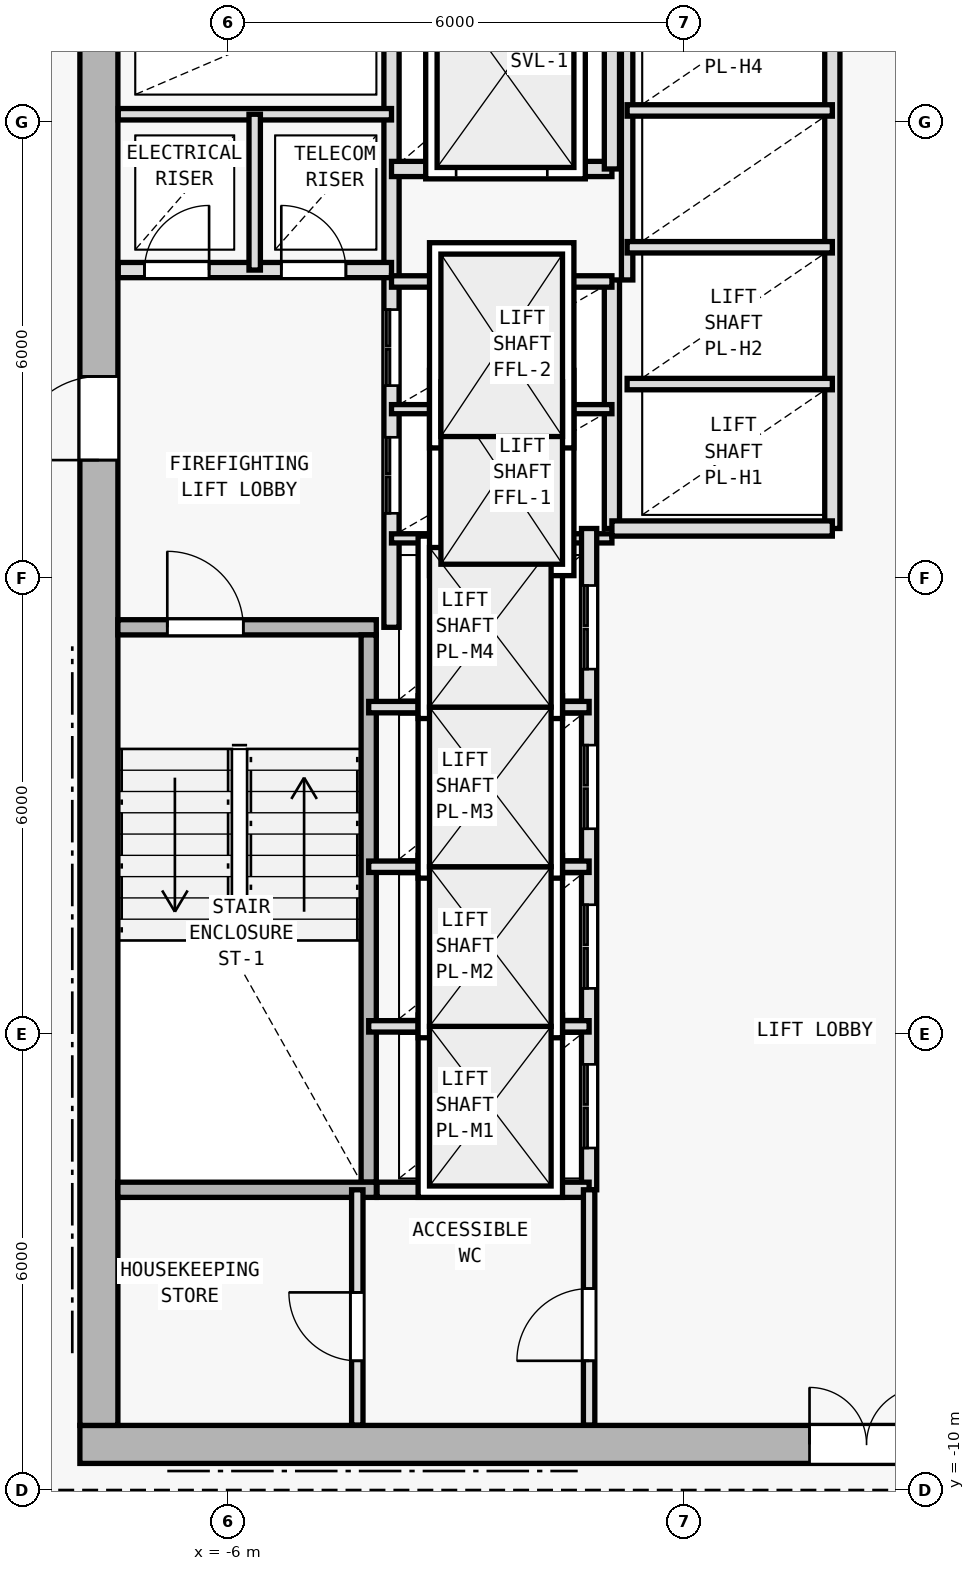
"""IFC4 building model, lengths in metres.
Left out: names, types, materials, properties, quantities, classifications, styles, units other than length and angle.
Written with IfcOpenShell. Run it as: python <this file> out.ifc"""

import sys

from ifc_helpers import new_model, si_unit, direction, frame, frame_2d, origin, origin_2d, place, context, subcontext, project, spatial, rectangle, i_section, extrude, element, fill, save


model = new_model("IFC4")
c1 = context("Model", 3, precision=1e-05, world=origin(), true_north=direction((0.0, 1.0)))
c2 = subcontext(c1, "Body", "Model", "MODEL_VIEW")
j1 = project(units=[si_unit("LENGTHUNIT", "METRE"), si_unit("PLANEANGLEUNIT", "RADIAN")], contexts=[c1])
p1 = place(None, origin())
s1 = spatial("IfcSite", under=j1, at=p1, CompositionType="ELEMENT")
p2 = place(p1, origin())
s2 = spatial("IfcBuilding", under=s1, at=p2, CompositionType="ELEMENT")
p3 = place(p2, frame((0.0, 0.0, 178.2)))
s3 = spatial("IfcBuildingStorey", under=s2, at=p3, CompositionType="ELEMENT", Elevation=178.2)
for number, where, z_axis, x_axis in (
    (1, (-7.7, -9.4, 0.0), (0.0, 0.0, 1.0), (1.0, 0.0, 0.0)),
    (2, (0.0, -9.4, 0.0), (0.0, 0.0, 1.0), (1.0, 0.0, 0.0)),
    (3, (-7.7, 2.0, 0.0), (0.0, 0.0, 1.0), (1.0, 0.0, 0.0)),
):
    element("IfcColumn", number, at=place(p3, frame(where, z_axis=z_axis, x_axis=x_axis)), inside=s3, PredefinedType="COLUMN", context=c2, shape_type="SweptSolid", body=[
        extrude(i_section(OverallWidth=0.404, OverallDepth=0.407, WebThickness=0.017, FlangeThickness=0.028, FilletRadius=0.015, at=origin_2d()), origin(), (0.0, 0.0, 1.0), 3.6),
    ])
p4 = place(p3, frame((-7.95, -9.4, 0.0), z_axis=(0.0, 0.0, 1.0), x_axis=(1.0, 0.0, 0.0)))
e4 = element("IfcWall", 4, at=p4, inside=s3, PredefinedType="SHEAR", context=c2, shape_type="SweptSolid", body=[
    extrude(rectangle(XDim=15.9, YDim=0.5, at=frame_2d((7.95, 0.0))), origin(), (0.0, 0.0, 1.0), 3.35),
])
p5 = place(p4, frame((9.6, 0.0, 0.0)))
e5 = element("IfcOpeningElement", 5, at=p5, cuts=e4, PredefinedType="OPENING", context=c2, shape_type="SweptSolid", body=[
    extrude(rectangle(XDim=1.5, YDim=2.2, at=frame_2d((0.75, 1.1))), frame((0.0, 0.26, 0.0), z_axis=(0.0, -1.0, 0.0), x_axis=(1.0, 0.0, 0.0)), (0.0, 0.0, 1.0), 0.52),
])
p6 = place(p3, frame((-7.7, -9.15, 0.0), z_axis=(0.0, 0.0, 1.0), x_axis=(0.0, 1.0, 0.0)))
e6 = element("IfcWall", 6, at=p6, inside=s3, PredefinedType="SHEAR", context=c2, shape_type="SweptSolid", body=[
    extrude(rectangle(XDim=19.1, YDim=0.5, at=frame_2d((9.55, 0.0))), origin(), (0.0, 0.0, 1.0), 3.35),
])
p7 = place(p6, frame((12.7, 0.0, 0.0)))
e7 = element("IfcOpeningElement", 7, at=p7, cuts=e6, PredefinedType="OPENING", context=c2, shape_type="SweptSolid", body=[
    extrude(rectangle(XDim=1.1, YDim=2.15, at=frame_2d((0.55, 1.075))), frame((0.0, 0.26, 0.0), z_axis=(0.0, -1.0, 0.0), x_axis=(1.0, 0.0, 0.0)), (0.0, 0.0, 1.0), 0.52),
])
p8 = place(p3, frame((-7.45, 1.35, 0.0), z_axis=(0.0, 0.0, 1.0), x_axis=(1.0, 0.0, 0.0)))
e8 = element("IfcWall", 8, at=p8, inside=s3, PredefinedType="SOLIDWALL", context=c2, shape_type="SweptSolid", body=[
    extrude(rectangle(XDim=3.4, YDim=0.2, at=frame_2d((1.7, 0.0))), origin(), (0.0, 0.0, 1.0), 3.35),
])
p9 = place(p8, frame((0.65, 0.0, 0.0)))
e9 = element("IfcOpeningElement", 9, at=p9, cuts=e8, PredefinedType="OPENING", context=c2, shape_type="SweptSolid", body=[
    extrude(rectangle(XDim=1.0, YDim=2.15, at=frame_2d((0.5, 1.075))), frame((0.0, 0.11, 0.0), z_axis=(0.0, -1.0, 0.0), x_axis=(1.0, 0.0, 0.0)), (0.0, 0.0, 1.0), 0.22),
])
p10 = place(p3, frame((-4.15, -5.95, 0.0), z_axis=(0.0, 0.0, 1.0), x_axis=(0.0, 1.0, 0.0)))
e10 = element("IfcWall", 10, at=p10, inside=s3, PredefinedType="SOLIDWALL", context=c2, shape_type="SweptSolid", body=[
    extrude(rectangle(XDim=7.2, YDim=0.2, at=frame_2d((3.6, 0.0))), origin(), (0.0, 0.0, 1.0), 3.35),
])
p11 = place(p3, frame((-3.85, 1.35, 0.0), z_axis=(0.0, 0.0, 1.0), x_axis=(0.0, 1.0, 0.0)))
e11 = element("IfcWall", 11, at=p11, inside=s3, PredefinedType="SOLIDWALL", context=c2, shape_type="SweptSolid", body=[
    extrude(rectangle(XDim=8.595, YDim=0.2, at=frame_2d((4.297, 0.0))), origin(), (0.0, 0.0, 1.0), 3.35),
])
p12 = place(p11, frame((1.5, 0.0, 0.0)))
e12 = element("IfcOpeningElement", 12, at=p12, cuts=e11, PredefinedType="OPENING", context=c2, shape_type="SweptSolid", body=[
    extrude(rectangle(XDim=1.0, YDim=2.15, at=frame_2d((0.5, 1.075))), frame((0.0, 0.11, 0.0), z_axis=(0.0, -1.0, 0.0), x_axis=(1.0, 0.0, 0.0)), (0.0, 0.0, 1.0), 0.22),
])
p13 = place(p11, frame((3.18, 0.0, 0.0)))
e13 = element("IfcOpeningElement", 13, at=p13, cuts=e11, PredefinedType="OPENING", context=c2, shape_type="SweptSolid", body=[
    extrude(rectangle(XDim=1.0, YDim=2.15, at=frame_2d((0.5, 1.075))), frame((0.0, 0.11, 0.0), z_axis=(0.0, -1.0, 0.0), x_axis=(1.0, 0.0, 0.0)), (0.0, 0.0, 1.0), 0.22),
])
p14 = place(p3, frame((-7.445, 6.05, 0.0), z_axis=(0.0, 0.0, 1.0), x_axis=(1.0, 0.0, 0.0)))
e14 = element("IfcWall", 14, at=p14, inside=s3, PredefinedType="SOLIDWALL", context=c2, shape_type="SweptSolid", body=[
    extrude(rectangle(XDim=3.595, YDim=0.2, at=frame_2d((1.797, 0.0))), origin(), (0.0, 0.0, 1.0), 3.35),
])
p15 = place(p14, frame((0.345, 0.0, 0.0)))
e15 = element("IfcOpeningElement", 15, at=p15, cuts=e14, PredefinedType="OPENING", context=c2, shape_type="SweptSolid", body=[
    extrude(rectangle(XDim=0.85, YDim=2.1, at=frame_2d((0.425, 1.05))), frame((0.0, 0.11, 0.0), z_axis=(0.0, -1.0, 0.0), x_axis=(1.0, 0.0, 0.0)), (0.0, 0.0, 1.0), 0.22),
])
p16 = place(p14, frame((2.145, 0.0, 0.0)))
e16 = element("IfcOpeningElement", 16, at=p16, cuts=e14, PredefinedType="OPENING", context=c2, shape_type="SweptSolid", body=[
    extrude(rectangle(XDim=0.85, YDim=2.1, at=frame_2d((0.425, 1.05))), frame((0.0, 0.11, 0.0), z_axis=(0.0, -1.0, 0.0), x_axis=(1.0, 0.0, 0.0)), (0.0, 0.0, 1.0), 0.22),
])
p17 = place(p3, frame((-7.445, 8.1, 0.0), z_axis=(0.0, 0.0, 1.0), x_axis=(1.0, 0.0, 0.0)))
e17 = element("IfcWall", 17, at=p17, inside=s3, PredefinedType="PARTITIONING", context=c2, shape_type="SweptSolid", body=[
    extrude(rectangle(XDim=3.595, YDim=0.15, at=frame_2d((1.797, 0.0))), origin(), (0.0, 0.0, 1.0), 3.35),
])
p18 = place(p3, frame((-5.65, 6.05, 0.0), z_axis=(0.0, 0.0, 1.0), x_axis=(0.0, 1.0, 0.0)))
e18 = element("IfcWall", 18, at=p18, inside=s3, PredefinedType="PARTITIONING", context=c2, shape_type="SweptSolid", body=[
    extrude(rectangle(XDim=2.05, YDim=0.15, at=frame_2d((1.025, 0.0))), origin(), (0.0, 0.0, 1.0), 3.35),
])
p19 = place(p3, frame((-0.95, 2.65, 0.0), z_axis=(0.0, 0.0, 1.0), x_axis=(0.0, 1.0, 0.0)))
e19 = element("IfcWall", 19, at=p19, inside=s3, PredefinedType="SOLIDWALL", context=c2, shape_type="SweptSolid", body=[
    extrude(rectangle(XDim=3.27, YDim=0.2, at=frame_2d((1.635, 0.0))), origin(), (0.0, 0.0, 1.0), 3.35),
])
for number, where, z_axis, x_axis in (
    (20, (-3.85, 2.52, 0.0), (0.0, 0.0, 1.0), (1.0, 0.0, 0.0)),
    (21, (-3.85, 4.22, 0.0), (0.0, 0.0, 1.0), (1.0, 0.0, 0.0)),
):
    element("IfcWall", number, at=place(p3, frame(where, z_axis=z_axis, x_axis=x_axis)), inside=s3, PredefinedType="PARTITIONING", context=c2, shape_type="SweptSolid", body=[
        extrude(rectangle(XDim=2.9, YDim=0.12, at=frame_2d((1.45, 0.0))), origin(), (0.0, 0.0, 1.0), 3.35),
    ])
p20 = place(p3, frame((-3.85, 5.9, 0.0), z_axis=(0.0, 0.0, 1.0), x_axis=(1.0, 0.0, 0.0)))
e22 = element("IfcWall", 22, at=p20, inside=s3, PredefinedType="PARTITIONING", context=c2, shape_type="SweptSolid", body=[
    extrude(rectangle(XDim=2.9, YDim=0.15, at=frame_2d((1.45, 0.0))), origin(), (0.0, 0.0, 1.0), 3.35),
])
p21 = place(p3, frame((-3.85, 7.38, 0.0), z_axis=(0.0, 0.0, 1.0), x_axis=(1.0, 0.0, 0.0)))
e23 = element("IfcWall", 23, at=p21, inside=s3, PredefinedType="SOLIDWALL", context=c2, shape_type="SweptSolid", body=[
    extrude(rectangle(XDim=2.9, YDim=0.2, at=frame_2d((1.45, 0.0))), origin(), (0.0, 0.0, 1.0), 3.35),
])
p22 = place(p21, frame((0.85, 0.0, 0.0)))
e24 = element("IfcOpeningElement", 24, at=p22, cuts=e23, PredefinedType="OPENING", context=c2, shape_type="SweptSolid", body=[
    extrude(rectangle(XDim=1.2, YDim=2.2, at=frame_2d((0.6, 1.1))), frame((0.0, 0.11, 0.0), z_axis=(0.0, -1.0, 0.0), x_axis=(1.0, 0.0, 0.0)), (0.0, 0.0, 1.0), 0.22),
])
p23 = place(p3, frame((-0.95, 7.38, 0.0), z_axis=(0.0, 0.0, 1.0), x_axis=(0.0, 1.0, 0.0)))
e25 = element("IfcWall", 25, at=p23, inside=s3, PredefinedType="SOLIDWALL", context=c2, shape_type="SweptSolid", body=[
    extrude(rectangle(XDim=2.565, YDim=0.2, at=frame_2d((1.283, 0.0))), origin(), (0.0, 0.0, 1.0), 3.35),
])
p24 = place(p3, frame((-1.25, -6.05, 0.0), z_axis=(0.0, 0.0, 1.0), x_axis=(0.0, 1.0, 0.0)))
e26 = element("IfcWall", 26, at=p24, inside=s3, PredefinedType="SOLIDWALL", context=c2, shape_type="SweptSolid", body=[
    extrude(rectangle(XDim=8.7, YDim=0.2, at=frame_2d((4.35, 0.0))), origin(), (0.0, 0.0, 1.0), 3.35),
])
p25 = place(p24, frame((0.55, 0.0, 0.0)))
e27 = element("IfcOpeningElement", 27, at=p25, cuts=e26, PredefinedType="OPENING", context=c2, shape_type="SweptSolid", body=[
    extrude(rectangle(XDim=1.1, YDim=2.15, at=frame_2d((0.55, 1.075))), frame((0.0, 0.11, 0.0), z_axis=(0.0, -1.0, 0.0), x_axis=(1.0, 0.0, 0.0)), (0.0, 0.0, 1.0), 0.22),
])
p26 = place(p24, frame((2.65, 0.0, 0.0)))
e28 = element("IfcOpeningElement", 28, at=p26, cuts=e26, PredefinedType="OPENING", context=c2, shape_type="SweptSolid", body=[
    extrude(rectangle(XDim=1.1, YDim=2.15, at=frame_2d((0.55, 1.075))), frame((0.0, 0.11, 0.0), z_axis=(0.0, -1.0, 0.0), x_axis=(1.0, 0.0, 0.0)), (0.0, 0.0, 1.0), 0.22),
])
p27 = place(p24, frame((4.75, 0.0, 0.0)))
e29 = element("IfcOpeningElement", 29, at=p27, cuts=e26, PredefinedType="OPENING", context=c2, shape_type="SweptSolid", body=[
    extrude(rectangle(XDim=1.1, YDim=2.15, at=frame_2d((0.55, 1.075))), frame((0.0, 0.11, 0.0), z_axis=(0.0, -1.0, 0.0), x_axis=(1.0, 0.0, 0.0)), (0.0, 0.0, 1.0), 0.22),
])
p28 = place(p24, frame((6.85, 0.0, 0.0)))
e30 = element("IfcOpeningElement", 30, at=p28, cuts=e26, PredefinedType="OPENING", context=c2, shape_type="SweptSolid", body=[
    extrude(rectangle(XDim=1.1, YDim=2.15, at=frame_2d((0.55, 1.075))), frame((0.0, 0.11, 0.0), z_axis=(0.0, -1.0, 0.0), x_axis=(1.0, 0.0, 0.0)), (0.0, 0.0, 1.0), 0.22),
])
for number, where, z_axis, x_axis in (
    (31, (-4.15, -3.9, 0.0), (0.0, 0.0, 1.0), (1.0, 0.0, 0.0)),
    (32, (-4.15, -1.8, 0.0), (0.0, 0.0, 1.0), (1.0, 0.0, 0.0)),
    (33, (-4.15, 0.3, 0.0), (0.0, 0.0, 1.0), (1.0, 0.0, 0.0)),
):
    element("IfcWall", number, at=place(p3, frame(where, z_axis=z_axis, x_axis=x_axis)), inside=s3, PredefinedType="PARTITIONING", context=c2, shape_type="SweptSolid", body=[
        extrude(rectangle(XDim=2.9, YDim=0.15, at=frame_2d((1.45, 0.0))), origin(), (0.0, 0.0, 1.0), 3.35),
    ])
p29 = place(p3, frame((1.95, 2.65, 0.0), z_axis=(0.0, 0.0, 1.0), x_axis=(0.0, 1.0, 0.0)))
e34 = element("IfcWall", 34, at=p29, inside=s3, PredefinedType="SOLIDWALL", context=c2, shape_type="SweptSolid", body=[
    extrude(rectangle(XDim=7.295, YDim=0.2, at=frame_2d((3.647, 0.0))), origin(), (0.0, 0.0, 1.0), 3.35),
])
p30 = place(p3, frame((-0.95, 2.65, 0.0), z_axis=(0.0, 0.0, 1.0), x_axis=(1.0, 0.0, 0.0)))
e35 = element("IfcWall", 35, at=p30, inside=s3, PredefinedType="SOLIDWALL", context=c2, shape_type="SweptSolid", body=[
    extrude(rectangle(XDim=2.9, YDim=0.2, at=frame_2d((1.45, 0.0))), origin(), (0.0, 0.0, 1.0), 3.35),
])
p31 = place(p3, frame((-0.75, 5.92, 0.0), z_axis=(0.0, 0.0, 1.0), x_axis=(0.0, 1.0, 0.0)))
e36 = element("IfcWall", 36, at=p31, inside=s3, PredefinedType="PARTITIONING", context=c2, shape_type="SweptSolid", body=[
    extrude(rectangle(XDim=4.025, YDim=0.15, at=frame_2d((2.013, 0.0))), origin(), (0.0, 0.0, 1.0), 3.35),
])
for number, where, z_axis, x_axis in (
    (37, (-0.75, 4.55, 0.0), (0.0, 0.0, 1.0), (1.0, 0.0, 0.0)),
    (38, (-0.75, 6.35, 0.0), (0.0, 0.0, 1.0), (1.0, 0.0, 0.0)),
    (39, (-0.75, 8.15, 0.0), (0.0, 0.0, 1.0), (1.0, 0.0, 0.0)),
):
    element("IfcWall", number, at=place(p3, frame(where, z_axis=z_axis, x_axis=x_axis)), inside=s3, PredefinedType="PARTITIONING", context=c2, shape_type="SweptSolid", body=[
        extrude(rectangle(XDim=2.7, YDim=0.15, at=frame_2d((1.35, 0.0))), origin(), (0.0, 0.0, 1.0), 3.35),
    ])
p32 = place(p3, frame((-7.45, -6.05, 0.0), z_axis=(0.0, 0.0, 1.0), x_axis=(1.0, 0.0, 0.0)))
e40 = element("IfcWall", 40, at=p32, inside=s3, PredefinedType="SOLIDWALL", context=c2, shape_type="SweptSolid", body=[
    extrude(rectangle(XDim=3.4, YDim=0.2, at=frame_2d((1.7, 0.0))), origin(), (0.0, 0.0, 1.0), 3.35),
])
p33 = place(p3, frame((-4.04, -6.05, 0.0), z_axis=(0.0, 0.0, 1.0), x_axis=(1.0, 0.0, 0.0)))
e41 = element("IfcWall", 41, at=p33, inside=s3, PredefinedType="SOLIDWALL", context=c2, shape_type="SweptSolid", body=[
    extrude(rectangle(XDim=2.79, YDim=0.2, at=frame_2d((1.395, 0.0))), origin(), (0.0, 0.0, 1.0), 3.35),
])
p34 = place(p3, frame((-1.25, -9.145, 0.0), z_axis=(0.0, 0.0, 1.0), x_axis=(0.0, 1.0, 0.0)))
e42 = element("IfcWall", 42, at=p34, inside=s3, PredefinedType="PARTITIONING", context=c2, shape_type="SweptSolid", body=[
    extrude(rectangle(XDim=3.095, YDim=0.15, at=frame_2d((1.547, 0.0))), origin(), (0.0, 0.0, 1.0), 3.35),
])
p35 = place(p34, frame((0.845, 0.0, 0.0)))
e43 = element("IfcOpeningElement", 43, at=p35, cuts=e42, PredefinedType="OPENING", context=c2, shape_type="SweptSolid", body=[
    extrude(rectangle(XDim=0.95, YDim=2.1, at=frame_2d((0.475, 1.05))), frame((0.0, 0.085, 0.0), z_axis=(0.0, -1.0, 0.0), x_axis=(1.0, 0.0, 0.0)), (0.0, 0.0, 1.0), 0.17),
])
p36 = place(p3, frame((-4.3, -9.145, 0.0), z_axis=(0.0, 0.0, 1.0), x_axis=(0.0, 1.0, 0.0)))
e44 = element("IfcWall", 44, at=p36, inside=s3, PredefinedType="PARTITIONING", context=c2, shape_type="SweptSolid", body=[
    extrude(rectangle(XDim=3.095, YDim=0.15, at=frame_2d((1.547, 0.0))), origin(), (0.0, 0.0, 1.0), 3.35),
])
p37 = place(p36, frame((0.845, 0.0, 0.0)))
e45 = element("IfcOpeningElement", 45, at=p37, cuts=e44, PredefinedType="OPENING", context=c2, shape_type="SweptSolid", body=[
    extrude(rectangle(XDim=0.9, YDim=2.1, at=frame_2d((0.45, 1.05))), frame((0.0, 0.085, 0.0), z_axis=(0.0, -1.0, 0.0), x_axis=(1.0, 0.0, 0.0)), (0.0, 0.0, 1.0), 0.17),
])
p38 = place(p3, frame((-9.86, 8.426, 0.0), z_axis=(0.0, 0.0, 1.0), x_axis=(0.582449511476, 0.812866881218, 0.0)))
e46 = element("IfcWall", 46, at=p38, inside=s3, PredefinedType="PARTITIONING", context=c2, shape_type="SweptSolid", body=[
    extrude(rectangle(XDim=4.84, YDim=0.15, at=frame_2d((2.42, 0.0))), origin(), (0.0, 0.0, 1.0), 3.005),
])
p39 = place(p5, origin())
e47 = element("IfcDoor", 47, at=p39, inside=s3, OperationType="DOUBLE_DOOR_SINGLE_SWING", PredefinedType="DOOR", context=c2, shape_type="SweptSolid", body=[
    extrude(rectangle(XDim=1.5, YDim=2.2, at=frame_2d((0.75, 1.1))), frame((0.0, 0.025, 0.0), z_axis=(0.0, -1.0, 0.0), x_axis=(1.0, 0.0, 0.0)), (0.0, 0.0, 1.0), 0.05),
])
fill(e5, e47)
p40 = place(p7, origin())
e48 = element("IfcDoor", 48, at=p40, inside=s3, OperationType="SINGLE_SWING_LEFT", PredefinedType="DOOR", context=c2, shape_type="SweptSolid", body=[
    extrude(rectangle(XDim=1.1, YDim=2.15, at=frame_2d((0.55, 1.075))), frame((0.0, 0.025, 0.0), z_axis=(0.0, -1.0, 0.0), x_axis=(1.0, 0.0, 0.0)), (0.0, 0.0, 1.0), 0.05),
])
fill(e7, e48)
p41 = place(p9, origin())
e49 = element("IfcDoor", 49, at=p41, inside=s3, OperationType="SINGLE_SWING_LEFT", PredefinedType="DOOR", context=c2, shape_type="SweptSolid", body=[
    extrude(rectangle(XDim=1.0, YDim=2.15, at=frame_2d((0.5, 1.075))), frame((0.0, 0.025, 0.0), z_axis=(0.0, -1.0, 0.0), x_axis=(1.0, 0.0, 0.0)), (0.0, 0.0, 1.0), 0.05),
])
fill(e9, e49)
p42 = place(p15, origin())
e50 = element("IfcDoor", 50, at=p42, inside=s3, OperationType="SINGLE_SWING_RIGHT", PredefinedType="DOOR", context=c2, shape_type="SweptSolid", body=[
    extrude(rectangle(XDim=0.85, YDim=2.1, at=frame_2d((0.425, 1.05))), frame((0.0, 0.025, 0.0), z_axis=(0.0, -1.0, 0.0), x_axis=(1.0, 0.0, 0.0)), (0.0, 0.0, 1.0), 0.05),
])
fill(e15, e50)
p43 = place(p16, origin())
e51 = element("IfcDoor", 51, at=p43, inside=s3, OperationType="SINGLE_SWING_LEFT", PredefinedType="DOOR", context=c2, shape_type="SweptSolid", body=[
    extrude(rectangle(XDim=0.85, YDim=2.1, at=frame_2d((0.425, 1.05))), frame((0.0, 0.025, 0.0), z_axis=(0.0, -1.0, 0.0), x_axis=(1.0, 0.0, 0.0)), (0.0, 0.0, 1.0), 0.05),
])
fill(e16, e51)
p44 = place(p22, origin())
e52 = element("IfcDoor", 52, at=p44, inside=s3, OperationType="DOUBLE_DOOR_SLIDING", PredefinedType="DOOR", context=c2, shape_type="SweptSolid", body=[
    extrude(rectangle(XDim=1.2, YDim=2.2, at=frame_2d((0.6, 1.1))), frame((0.0, 0.025, 0.0), z_axis=(0.0, -1.0, 0.0), x_axis=(1.0, 0.0, 0.0)), (0.0, 0.0, 1.0), 0.05),
])
fill(e24, e52)
p45 = place(p25, origin())
e53 = element("IfcDoor", 53, at=p45, inside=s3, OperationType="DOUBLE_DOOR_SLIDING", PredefinedType="DOOR", context=c2, shape_type="SweptSolid", body=[
    extrude(rectangle(XDim=1.1, YDim=2.15, at=frame_2d((0.55, 1.075))), frame((0.0, 0.025, 0.0), z_axis=(0.0, -1.0, 0.0), x_axis=(1.0, 0.0, 0.0)), (0.0, 0.0, 1.0), 0.05),
])
fill(e27, e53)
p46 = place(p26, origin())
e54 = element("IfcDoor", 54, at=p46, inside=s3, OperationType="DOUBLE_DOOR_SLIDING", PredefinedType="DOOR", context=c2, shape_type="SweptSolid", body=[
    extrude(rectangle(XDim=1.1, YDim=2.15, at=frame_2d((0.55, 1.075))), frame((0.0, 0.025, 0.0), z_axis=(0.0, -1.0, 0.0), x_axis=(1.0, 0.0, 0.0)), (0.0, 0.0, 1.0), 0.05),
])
fill(e28, e54)
p47 = place(p27, origin())
e55 = element("IfcDoor", 55, at=p47, inside=s3, OperationType="DOUBLE_DOOR_SLIDING", PredefinedType="DOOR", context=c2, shape_type="SweptSolid", body=[
    extrude(rectangle(XDim=1.1, YDim=2.15, at=frame_2d((0.55, 1.075))), frame((0.0, 0.025, 0.0), z_axis=(0.0, -1.0, 0.0), x_axis=(1.0, 0.0, 0.0)), (0.0, 0.0, 1.0), 0.05),
])
fill(e29, e55)
p48 = place(p28, origin())
e56 = element("IfcDoor", 56, at=p48, inside=s3, OperationType="DOUBLE_DOOR_SLIDING", PredefinedType="DOOR", context=c2, shape_type="SweptSolid", body=[
    extrude(rectangle(XDim=1.1, YDim=2.15, at=frame_2d((0.55, 1.075))), frame((0.0, 0.025, 0.0), z_axis=(0.0, -1.0, 0.0), x_axis=(1.0, 0.0, 0.0)), (0.0, 0.0, 1.0), 0.05),
])
fill(e30, e56)
p49 = place(p12, origin())
e57 = element("IfcDoor", 57, at=p49, inside=s3, OperationType="DOUBLE_DOOR_SLIDING", PredefinedType="DOOR", context=c2, shape_type="SweptSolid", body=[
    extrude(rectangle(XDim=1.0, YDim=2.15, at=frame_2d((0.5, 1.075))), frame((0.0, 0.025, 0.0), z_axis=(0.0, -1.0, 0.0), x_axis=(1.0, 0.0, 0.0)), (0.0, 0.0, 1.0), 0.05),
])
fill(e12, e57)
p50 = place(p13, origin())
e58 = element("IfcDoor", 58, at=p50, inside=s3, OperationType="DOUBLE_DOOR_SLIDING", PredefinedType="DOOR", context=c2, shape_type="SweptSolid", body=[
    extrude(rectangle(XDim=1.0, YDim=2.15, at=frame_2d((0.5, 1.075))), frame((0.0, 0.025, 0.0), z_axis=(0.0, -1.0, 0.0), x_axis=(1.0, 0.0, 0.0)), (0.0, 0.0, 1.0), 0.05),
])
fill(e13, e58)
p51 = place(p35, origin())
e59 = element("IfcDoor", 59, at=p51, inside=s3, OperationType="SINGLE_SWING_LEFT", PredefinedType="DOOR", context=c2, shape_type="SweptSolid", body=[
    extrude(rectangle(XDim=0.95, YDim=2.1, at=frame_2d((0.475, 1.05))), frame((0.0, 0.025, 0.0), z_axis=(0.0, -1.0, 0.0), x_axis=(1.0, 0.0, 0.0)), (0.0, 0.0, 1.0), 0.05),
])
fill(e43, e59)
p52 = place(p37, origin())
e60 = element("IfcDoor", 60, at=p52, inside=s3, OperationType="SINGLE_SWING_RIGHT", PredefinedType="DOOR", context=c2, shape_type="SweptSolid", body=[
    extrude(rectangle(XDim=0.9, YDim=2.1, at=frame_2d((0.45, 1.05))), frame((0.0, 0.025, 0.0), z_axis=(0.0, -1.0, 0.0), x_axis=(1.0, 0.0, 0.0)), (0.0, 0.0, 1.0), 0.05),
])
fill(e45, e60)
save(model, sys.argv[1])
